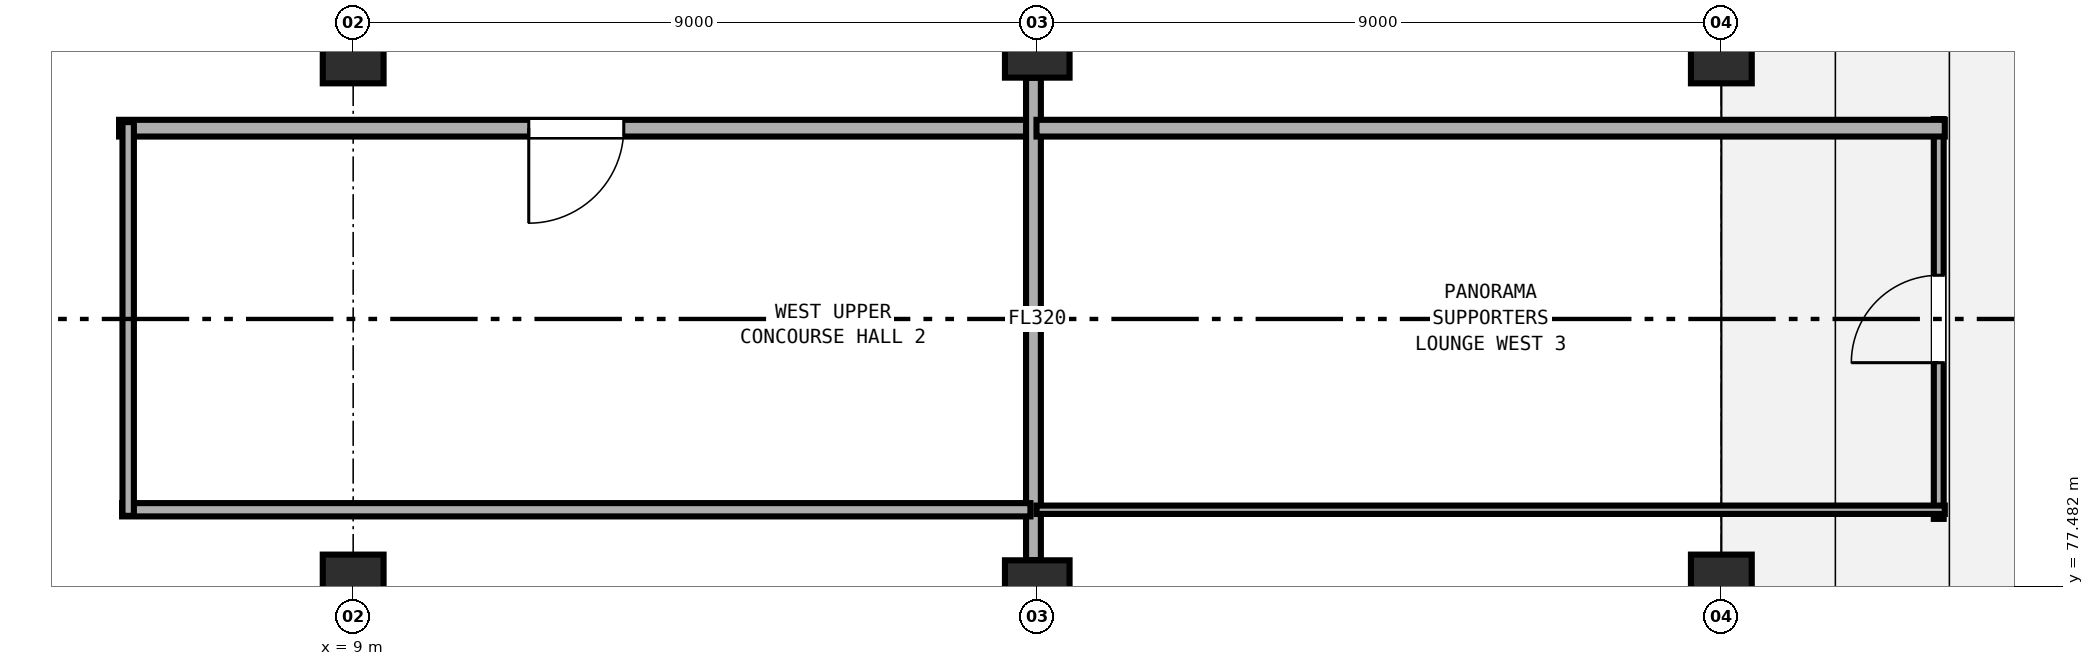
"""IFC4 building model, lengths in metres.
Left out: names, types, materials, properties, quantities, classifications, styles, units other than length and angle.
Written with IfcOpenShell. Run it as: python <this file> out.ifc"""

import sys

from ifc_helpers import new_model, si_unit, direction, frame, frame_2d, origin, origin_2d, place, context, subcontext, project, spatial, rectangle, extrude, element, fill, save


model = new_model("IFC4")
c1 = context("Model", 3, precision=1e-05, world=origin(), true_north=direction((0.0, 1.0)))
c2 = subcontext(c1, "Body", "Model", "MODEL_VIEW")
j1 = project(units=[si_unit("LENGTHUNIT", "METRE"), si_unit("PLANEANGLEUNIT", "RADIAN")], contexts=[c1])
p1 = place(None, origin())
s1 = spatial("IfcSite", under=j1, at=p1, CompositionType="ELEMENT")
p2 = place(p1, origin())
s2 = spatial("IfcBuilding", under=s1, at=p2, CompositionType="ELEMENT")
p3 = place(p2, frame((0.0, 0.0, 19.2)))
s3 = spatial("IfcBuildingStorey", under=s2, at=p3, CompositionType="ELEMENT", Elevation=19.2)
for number, where, z_axis, x_axis in (
    (1, (9.0, 77.4, 0.0), (0.0, 0.0, 1.0), (1.0, 0.0, 0.0)),
    (2, (9.0, 84.6, 0.0), (0.0, 0.0, 1.0), (1.0, 0.0, 0.0)),
):
    element("IfcColumn", number, at=place(p3, frame(where, z_axis=z_axis, x_axis=x_axis)), inside=s3, PredefinedType="COLUMN", context=c2, shape_type="SweptSolid", body=[
        extrude(rectangle(XDim=0.8, YDim=1.0, at=origin_2d()), origin(), (0.0, 0.0, 1.0), 4.8),
    ])
for number, where, z_axis, x_axis in (
    (3, (18.0, 77.4, 0.0), (0.0, 0.0, 1.0), (1.0, 0.0, 0.0)),
    (4, (18.0, 84.6, 0.0), (0.0, 0.0, 1.0), (1.0, 0.0, 0.0)),
):
    element("IfcColumn", number, at=place(p3, frame(where, z_axis=z_axis, x_axis=x_axis)), inside=s3, PredefinedType="COLUMN", context=c2, shape_type="SweptSolid", body=[
        extrude(rectangle(XDim=0.85, YDim=0.85, at=origin_2d()), origin(), (0.0, 0.0, 1.0), 4.8),
    ])
for number, where, z_axis, x_axis in (
    (5, (27.0, 77.4, 0.0), (0.0, 0.0, 1.0), (1.0, 0.0, 0.0)),
    (6, (27.0, 84.6, 0.0), (0.0, 0.0, 1.0), (1.0, 0.0, 0.0)),
):
    element("IfcColumn", number, at=place(p3, frame(where, z_axis=z_axis, x_axis=x_axis)), inside=s3, PredefinedType="COLUMN", context=c2, shape_type="SweptSolid", body=[
        extrude(rectangle(XDim=0.8, YDim=1.0, at=origin_2d()), origin(), (0.0, 0.0, 1.0), 4.8),
    ])
p4 = place(p3, frame((17.95, 83.51, 0.0), z_axis=(0.0, 0.0, 1.0), x_axis=(-1.0, 0.0, 0.0)))
e7 = element("IfcWall", 7, at=p4, inside=s3, PredefinedType="PARTITIONING", context=c2, shape_type="SweptSolid", body=[
    extrude(rectangle(XDim=12.03, YDim=0.22, at=frame_2d((6.015, 0.0))), origin(), (0.0, 0.0, 1.0), 3.28),
])
p5 = place(p4, frame((5.39, 0.0, 0.0)))
e8 = element("IfcOpeningElement", 8, at=p5, cuts=e7, PredefinedType="OPENING", context=c2, shape_type="SweptSolid", body=[
    extrude(rectangle(XDim=1.25, YDim=2.15, at=frame_2d((0.625, 1.075))), frame((0.0, 0.12, 0.0), z_axis=(0.0, -1.0, 0.0), x_axis=(1.0, 0.0, 0.0)), (0.0, 0.0, 1.0), 0.24),
])
p6 = place(p3, frame((17.95, 84.173, 0.0), z_axis=(0.0, 0.0, 1.0), x_axis=(0.0, -1.0, 0.0)))
e9 = element("IfcWall", 9, at=p6, inside=s3, PredefinedType="PARTITIONING", context=c2, shape_type="SweptSolid", body=[
    extrude(rectangle(XDim=6.346, YDim=0.195, at=frame_2d((3.173, 0.0))), origin(), (0.0, 0.0, 1.0), 3.28),
])
p7 = place(p3, frame((17.91, 78.49, 0.0), z_axis=(0.0, 0.0, 1.0), x_axis=(-1.0, 0.0, 0.0)))
e10 = element("IfcWall", 10, at=p7, inside=s3, PredefinedType="PARTITIONING", context=c2, shape_type="SweptSolid", body=[
    extrude(rectangle(XDim=11.95, YDim=0.175, at=frame_2d((5.975, 0.0))), origin(), (0.0, 0.0, 1.0), 3.28),
])
p8 = place(p3, frame((6.04, 78.41, 0.0), z_axis=(0.0, 0.0, 1.0), x_axis=(0.0, 1.0, 0.0)))
e11 = element("IfcWall", 11, at=p8, inside=s3, PredefinedType="PARTITIONING", context=c2, shape_type="SweptSolid", body=[
    extrude(rectangle(XDim=5.18, YDim=0.15, at=frame_2d((2.59, 0.0))), origin(), (0.0, 0.0, 1.0), 3.28),
])
p9 = place(p3, frame((29.86, 78.37, 0.0), z_axis=(0.0, 0.0, 1.0), x_axis=(0.0, 1.0, 0.0)))
e12 = element("IfcWall", 12, at=p9, inside=s3, PredefinedType="PARTITIONING", context=c2, shape_type="SweptSolid", body=[
    extrude(rectangle(XDim=5.26, YDim=0.13, at=frame_2d((2.63, 0.0))), origin(), (0.0, 0.0, 1.0), 3.28),
])
p10 = place(p9, frame((2.055, 0.0, 0.0)))
e13 = element("IfcOpeningElement", 13, at=p10, cuts=e12, PredefinedType="OPENING", context=c2, shape_type="SweptSolid", body=[
    extrude(rectangle(XDim=1.15, YDim=2.15, at=frame_2d((0.575, 1.075))), frame((0.0, 0.075, 0.0), z_axis=(0.0, -1.0, 0.0), x_axis=(1.0, 0.0, 0.0)), (0.0, 0.0, 1.0), 0.15),
])
p11 = place(p3, frame((29.94, 78.49, 0.0), z_axis=(0.0, 0.0, 1.0), x_axis=(-1.0, 0.0, 0.0)))
e14 = element("IfcWall", 14, at=p11, inside=s3, PredefinedType="PARTITIONING", context=c2, shape_type="SweptSolid", body=[
    extrude(rectangle(XDim=11.95, YDim=0.11, at=frame_2d((5.975, 0.0))), origin(), (0.0, 0.0, 1.0), 3.28),
])
p12 = place(p3, frame((17.99, 83.51, 0.0), z_axis=(0.0, 0.0, 1.0), x_axis=(1.0, 0.0, 0.0)))
e15 = element("IfcWall", 15, at=p12, inside=s3, PredefinedType="PARTITIONING", context=c2, shape_type="SweptSolid", body=[
    extrude(rectangle(XDim=11.95, YDim=0.22, at=frame_2d((5.975, 0.0))), origin(), (0.0, 0.0, 1.0), 3.28),
])
p13 = place(p5, origin())
e16 = element("IfcDoor", 16, at=p13, inside=s3, OperationType="SINGLE_SWING_RIGHT", PredefinedType="DOOR", context=c2, shape_type="SweptSolid", body=[
    extrude(rectangle(XDim=1.25, YDim=2.15, at=frame_2d((0.625, 1.075))), frame((0.0, 0.025, 0.0), z_axis=(0.0, -1.0, 0.0), x_axis=(1.0, 0.0, 0.0)), (0.0, 0.0, 1.0), 0.05),
])
fill(e8, e16)
p14 = place(p10, origin())
e17 = element("IfcDoor", 17, at=p14, inside=s3, OperationType="SINGLE_SWING_LEFT", PredefinedType="DOOR", context=c2, shape_type="SweptSolid", body=[
    extrude(rectangle(XDim=1.15, YDim=2.15, at=frame_2d((0.575, 1.075))), frame((0.0, 0.025, 0.0), z_axis=(0.0, -1.0, 0.0), x_axis=(1.0, 0.0, 0.0)), (0.0, 0.0, 1.0), 0.05),
])
fill(e13, e17)
save(model, sys.argv[1])
